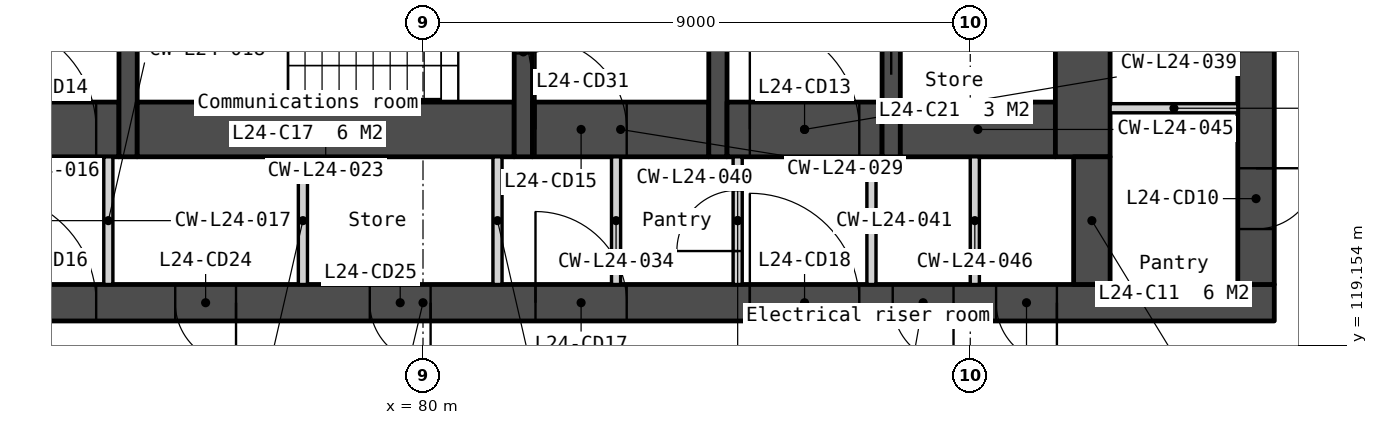
"""IFC4 building model, lengths in metres.
Left out: names, types, materials, properties, quantities, classifications, styles, units other than length and angle.
Written with IfcOpenShell. Run it as: python <this file> out.ifc"""

import sys

from ifc_helpers import new_model, si_unit, direction, frame, frame_2d, origin, place, context, subcontext, project, spatial, polyline, rectangle, outline, extrude, element, fill, save


model = new_model("IFC4")
c1 = context("Model", 3, precision=1e-05, world=origin(), true_north=direction((0.0, 1.0)))
c2 = subcontext(c1, "Body", "Model", "MODEL_VIEW")
j1 = project(units=[si_unit("LENGTHUNIT", "METRE"), si_unit("PLANEANGLEUNIT", "RADIAN")], contexts=[c1])
p1 = place(None, origin())
s1 = spatial("IfcSite", under=j1, at=p1, CompositionType="ELEMENT")
p2 = place(p1, origin())
s2 = spatial("IfcBuilding", under=s1, at=p2, CompositionType="ELEMENT")
p3 = place(p2, frame((0.0, 0.0, 99.3)))
s3 = spatial("IfcBuildingStorey", under=s2, at=p3, CompositionType="ELEMENT", Elevation=99.3)
p4 = place(p3, frame((66.0, 119.85, 0.0), z_axis=(0.0, 0.0, 1.0), x_axis=(1.0, 0.0, 0.0)))
e1 = element("IfcWall", 1, at=p4, inside=s3, PredefinedType="SOLIDWALL", context=c2, shape_type="SweptSolid", body=[
    extrude(rectangle(XDim=28.0, YDim=0.6, at=frame_2d((14.0, 0.0))), origin(), (0.0, 0.0, 1.0), 3.35),
])
p5 = place(p4, frame((6.825, 0.0, 0.0)))
e2 = element("IfcOpeningElement", 2, at=p5, cuts=e1, PredefinedType="OPENING", context=c2, shape_type="SweptSolid", body=[
    extrude(rectangle(XDim=1.8, YDim=2.1, at=frame_2d((0.9, 1.05))), frame((0.0, 0.31, 0.0), z_axis=(0.0, -1.0, 0.0), x_axis=(1.0, 0.0, 0.0)), (0.0, 0.0, 1.0), 0.62),
])
p6 = place(p4, frame((15.85, 0.0, 0.0)))
e3 = element("IfcOpeningElement", 3, at=p6, cuts=e1, PredefinedType="OPENING", context=c2, shape_type="SweptSolid", body=[
    extrude(rectangle(XDim=1.5, YDim=2.1, at=frame_2d((0.75, 1.05))), frame((0.0, 0.31, 0.0), z_axis=(0.0, -1.0, 0.0), x_axis=(1.0, 0.0, 0.0)), (0.0, 0.0, 1.0), 0.62),
])
p7 = place(p4, frame((19.375, 0.0, 0.0)))
e4 = element("IfcOpeningElement", 4, at=p7, cuts=e1, PredefinedType="OPENING", context=c2, shape_type="SweptSolid", body=[
    extrude(rectangle(XDim=1.8, YDim=2.1, at=frame_2d((0.9, 1.05))), frame((0.0, 0.31, 0.0), z_axis=(0.0, -1.0, 0.0), x_axis=(1.0, 0.0, 0.0)), (0.0, 0.0, 1.0), 0.62),
])
p8 = place(p4, frame((4.425, 0.0, 0.0)))
e5 = element("IfcOpeningElement", 5, at=p8, cuts=e1, PredefinedType="OPENING", context=c2, shape_type="SweptSolid", body=[
    extrude(rectangle(XDim=1.0, YDim=2.1, at=frame_2d((0.5, 1.05))), frame((0.0, 0.31, 0.0), z_axis=(0.0, -1.0, 0.0), x_axis=(1.0, 0.0, 0.0)), (0.0, 0.0, 1.0), 0.62),
])
p9 = place(p4, frame((9.925, 0.0, 0.0)))
e6 = element("IfcOpeningElement", 6, at=p9, cuts=e1, PredefinedType="OPENING", context=c2, shape_type="SweptSolid", body=[
    extrude(rectangle(XDim=1.0, YDim=2.1, at=frame_2d((0.5, 1.05))), frame((0.0, 0.31, 0.0), z_axis=(0.0, -1.0, 0.0), x_axis=(1.0, 0.0, 0.0)), (0.0, 0.0, 1.0), 0.62),
])
p10 = place(p4, frame((13.125, 0.0, 0.0)))
e7 = element("IfcOpeningElement", 7, at=p10, cuts=e1, PredefinedType="OPENING", context=c2, shape_type="SweptSolid", body=[
    extrude(rectangle(XDim=1.0, YDim=2.1, at=frame_2d((0.5, 1.05))), frame((0.0, 0.31, 0.0), z_axis=(0.0, -1.0, 0.0), x_axis=(1.0, 0.0, 0.0)), (0.0, 0.0, 1.0), 0.62),
])
p11 = place(p4, frame((21.725, 0.0, 0.0)))
e8 = element("IfcOpeningElement", 8, at=p11, cuts=e1, PredefinedType="OPENING", context=c2, shape_type="SweptSolid", body=[
    extrude(rectangle(XDim=1.0, YDim=2.1, at=frame_2d((0.5, 1.05))), frame((0.0, 0.31, 0.0), z_axis=(0.0, -1.0, 0.0), x_axis=(1.0, 0.0, 0.0)), (0.0, 0.0, 1.0), 0.62),
])
p12 = place(p4, frame((23.425, 0.0, 0.0)))
e9 = element("IfcOpeningElement", 9, at=p12, cuts=e1, PredefinedType="OPENING", context=c2, shape_type="SweptSolid", body=[
    extrude(rectangle(XDim=1.0, YDim=2.1, at=frame_2d((0.5, 1.05))), frame((0.0, 0.31, 0.0), z_axis=(0.0, -1.0, 0.0), x_axis=(1.0, 0.0, 0.0)), (0.0, 0.0, 1.0), 0.62),
])
p13 = place(p3, frame((72.45, 122.7, 0.0), z_axis=(0.0, 0.0, 1.0), x_axis=(1.0, 0.0, 0.0)))
e10 = element("IfcWall", 10, at=p13, inside=s3, PredefinedType="SOLIDWALL", context=c2, shape_type="SweptSolid", body=[
    extrude(rectangle(XDim=2.55, YDim=0.9, at=frame_2d((1.275, 0.0))), origin(), (0.0, 0.0, 1.0), 3.35),
])
p14 = place(p13, frame((0.375, 0.0, 0.0)))
e11 = element("IfcOpeningElement", 11, at=p14, cuts=e10, PredefinedType="OPENING", context=c2, shape_type="SweptSolid", body=[
    extrude(rectangle(XDim=1.8, YDim=2.1, at=frame_2d((0.9, 1.05))), frame((0.0, 0.46, 0.0), z_axis=(0.0, -1.0, 0.0), x_axis=(1.0, 0.0, 0.0)), (0.0, 0.0, 1.0), 0.92),
])
p15 = place(p3, frame((74.825, 122.25, 0.0), z_axis=(0.0, 0.0, 1.0), x_axis=(0.0, -1.0, 0.0)))
e12 = element("IfcWall", 12, at=p15, inside=s3, PredefinedType="PARTITIONING", context=c2, shape_type="SweptSolid", body=[
    extrude(rectangle(XDim=2.1, YDim=0.15, at=frame_2d((1.05, 0.0))), origin(), (0.0, 0.0, 1.0), 3.35),
])
p16 = place(p3, frame((75.15, 133.95, 0.0), z_axis=(0.0, 0.0, 1.0), x_axis=(0.0, -1.0, 0.0)))
e13 = element("IfcWall", 13, at=p16, inside=s3, PredefinedType="SOLIDWALL", context=c2, shape_type="SweptSolid", body=[
    extrude(rectangle(XDim=11.7, YDim=0.3, at=frame_2d((5.85, 0.0))), origin(), (0.0, 0.0, 1.0), 3.35),
])
p17 = place(p3, frame((75.3, 122.7, 0.0), z_axis=(0.0, 0.0, 1.0), x_axis=(1.0, 0.0, 0.0)))
e14 = element("IfcWall", 14, at=p17, inside=s3, PredefinedType="SOLIDWALL", context=c2, shape_type="SweptSolid", body=[
    extrude(rectangle(XDim=6.2, YDim=0.9, at=frame_2d((3.1, 0.0))), origin(), (0.0, 0.0, 1.0), 3.35),
])
for number, where, z_axis, x_axis in (
    (15, (78.025, 122.25, 0.0), (0.0, 0.0, 1.0), (0.0, -1.0, 0.0)),
    (16, (81.225, 122.25, 0.0), (0.0, 0.0, 1.0), (0.0, -1.0, 0.0)),
):
    element("IfcWall", number, at=place(p3, frame(where, z_axis=z_axis, x_axis=x_axis)), inside=s3, PredefinedType="PARTITIONING", context=c2, shape_type="SweptSolid", body=[
        extrude(rectangle(XDim=2.1, YDim=0.15, at=frame_2d((1.05, 0.0))), origin(), (0.0, 0.0, 1.0), 3.35),
    ])
p18 = place(p3, frame((81.65, 125.7, 0.0), z_axis=(0.0, 0.0, 1.0), x_axis=(0.0, -1.0, 0.0)))
e17 = element("IfcWall", 17, at=p18, inside=s3, PredefinedType="SOLIDWALL", context=c2, shape_type="SweptSolid", body=[
    extrude(rectangle(XDim=3.45, YDim=0.3, at=frame_2d((1.725, 0.0))), origin(), (0.0, 0.0, 1.0), 3.35),
])
p19 = place(p18, frame((0.75, 0.0, 0.0)))
e18 = element("IfcOpeningElement", 18, at=p19, cuts=e17, PredefinedType="OPENING", context=c2, shape_type="SweptSolid", body=[
    extrude(rectangle(XDim=1.0, YDim=2.1, at=frame_2d((0.5, 1.05))), frame((0.0, 0.16, 0.0), z_axis=(0.0, -1.0, 0.0), x_axis=(1.0, 0.0, 0.0)), (0.0, 0.0, 1.0), 0.32),
])
p20 = place(p3, frame((81.8, 122.7, 0.0), z_axis=(0.0, 0.0, 1.0), x_axis=(1.0, 0.0, 0.0)))
e19 = element("IfcWall", 19, at=p20, inside=s3, PredefinedType="SOLIDWALL", context=c2, shape_type="SweptSolid", body=[
    extrude(rectangle(XDim=2.9, YDim=0.9, at=frame_2d((1.45, 0.0))), origin(), (0.0, 0.0, 1.0), 3.35),
])
p21 = place(p20, frame((0.05, 0.0, 0.0)))
e20 = element("IfcOpeningElement", 20, at=p21, cuts=e19, PredefinedType="OPENING", context=c2, shape_type="SweptSolid", body=[
    extrude(rectangle(XDim=1.5, YDim=2.1, at=frame_2d((0.75, 1.05))), frame((0.0, 0.46, 0.0), z_axis=(0.0, -1.0, 0.0), x_axis=(1.0, 0.0, 0.0)), (0.0, 0.0, 1.0), 0.92),
])
p22 = place(p3, frame((83.175, 122.25, 0.0), z_axis=(0.0, 0.0, 1.0), x_axis=(0.0, -1.0, 0.0)))
e21 = element("IfcWall", 21, at=p22, inside=s3, PredefinedType="PARTITIONING", context=c2, shape_type="SweptSolid", body=[
    extrude(rectangle(XDim=2.1, YDim=0.15, at=frame_2d((1.05, 0.0))), origin(), (0.0, 0.0, 1.0), 3.35),
])
p23 = place(p3, frame((84.85, 133.95, 0.0), z_axis=(0.0, 0.0, 1.0), x_axis=(0.0, -1.0, 0.0)))
e22 = element("IfcWall", 22, at=p23, inside=s3, PredefinedType="SOLIDWALL", context=c2, shape_type="SweptSolid", body=[
    extrude(rectangle(XDim=11.7, YDim=0.3, at=frame_2d((5.85, 0.0))), origin(), (0.0, 0.0, 1.0), 3.35),
])
p24 = place(p3, frame((85.0, 122.7, 0.0), z_axis=(0.0, 0.0, 1.0), x_axis=(1.0, 0.0, 0.0)))
e23 = element("IfcWall", 23, at=p24, inside=s3, PredefinedType="SOLIDWALL", context=c2, shape_type="SweptSolid", body=[
    extrude(rectangle(XDim=2.55, YDim=0.9, at=frame_2d((1.275, 0.0))), origin(), (0.0, 0.0, 1.0), 3.35),
])
p25 = place(p24, frame((0.375, 0.0, 0.0)))
e24 = element("IfcOpeningElement", 24, at=p25, cuts=e23, PredefinedType="OPENING", context=c2, shape_type="SweptSolid", body=[
    extrude(rectangle(XDim=1.8, YDim=2.1, at=frame_2d((0.9, 1.05))), frame((0.0, 0.46, 0.0), z_axis=(0.0, -1.0, 0.0), x_axis=(1.0, 0.0, 0.0)), (0.0, 0.0, 1.0), 0.92),
])
p26 = place(p3, frame((85.175, 122.25, 0.0), z_axis=(0.0, 0.0, 1.0), x_axis=(0.0, -1.0, 0.0)))
e25 = element("IfcWall", 25, at=p26, inside=s3, PredefinedType="PARTITIONING", context=c2, shape_type="SweptSolid", body=[
    extrude(rectangle(XDim=2.1, YDim=0.15, at=frame_2d((1.05, 0.0))), origin(), (0.0, 0.0, 1.0), 3.35),
])
p27 = place(p26, frame((0.55, 0.0, 0.0)))
e26 = element("IfcOpeningElement", 26, at=p27, cuts=e25, PredefinedType="OPENING", context=c2, shape_type="SweptSolid", body=[
    extrude(rectangle(XDim=1.0, YDim=2.1, at=frame_2d((0.5, 1.05))), frame((0.0, 0.085, 0.0), z_axis=(0.0, -1.0, 0.0), x_axis=(1.0, 0.0, 0.0)), (0.0, 0.0, 1.0), 0.17),
])
p28 = place(p3, frame((87.375, 122.25, 0.0), z_axis=(0.0, 0.0, 1.0), x_axis=(0.0, -1.0, 0.0)))
e27 = element("IfcWall", 27, at=p28, inside=s3, PredefinedType="PARTITIONING", context=c2, shape_type="SweptSolid", body=[
    extrude(rectangle(XDim=2.1, YDim=0.15, at=frame_2d((1.05, 0.0))), origin(), (0.0, 0.0, 1.0), 3.35),
])
p29 = place(p3, frame((87.7, 133.95, 0.0), z_axis=(0.0, 0.0, 1.0), x_axis=(0.0, -1.0, 0.0)))
e28 = element("IfcWall", 28, at=p29, inside=s3, PredefinedType="SOLIDWALL", context=c2, shape_type="SweptSolid", body=[
    extrude(rectangle(XDim=11.7, YDim=0.3, at=frame_2d((5.85, 0.0))), origin(), (0.0, 0.0, 1.0), 3.35),
])
p30 = place(p29, frame((6.95, 0.0, 0.0)))
e29 = element("IfcOpeningElement", 29, at=p30, cuts=e28, PredefinedType="OPENING", context=c2, shape_type="SweptSolid", body=[
    extrude(rectangle(XDim=1.1, YDim=2.1, at=frame_2d((0.55, 1.05))), frame((0.0, 0.16, 0.0), z_axis=(0.0, -1.0, 0.0), x_axis=(1.0, 0.0, 0.0)), (0.0, 0.0, 1.0), 0.32),
])
p31 = place(p29, frame((5.1, 0.0, 0.0)))
e30 = element("IfcOpeningElement", 30, at=p31, cuts=e28, PredefinedType="OPENING", context=c2, shape_type="SweptSolid", body=[
    extrude(rectangle(XDim=1.0, YDim=2.1, at=frame_2d((0.5, 1.05))), frame((0.0, 0.16, 0.0), z_axis=(0.0, -1.0, 0.0), x_axis=(1.0, 0.0, 0.0)), (0.0, 0.0, 1.0), 0.32),
])
p32 = place(p29, frame((9.25, 0.0, 0.0)))
e31 = element("IfcOpeningElement", 31, at=p32, cuts=e28, PredefinedType="OPENING", context=c2, shape_type="SweptSolid", body=[
    extrude(rectangle(XDim=1.1, YDim=2.1, at=frame_2d((0.55, 1.05))), frame((0.0, 0.16, 0.0), z_axis=(0.0, -1.0, 0.0), x_axis=(1.0, 0.0, 0.0)), (0.0, 0.0, 1.0), 0.32),
])
p33 = place(p3, frame((87.85, 122.7, 0.0), z_axis=(0.0, 0.0, 1.0), x_axis=(1.0, 0.0, 0.0)))
e32 = element("IfcWall", 32, at=p33, inside=s3, PredefinedType="SOLIDWALL", context=c2, shape_type="SweptSolid", body=[
    extrude(rectangle(XDim=2.55, YDim=0.9, at=frame_2d((1.275, 0.0))), origin(), (0.0, 0.0, 1.0), 3.35),
])
p34 = place(p3, frame((89.075, 122.25, 0.0), z_axis=(0.0, 0.0, 1.0), x_axis=(0.0, -1.0, 0.0)))
e33 = element("IfcWall", 33, at=p34, inside=s3, PredefinedType="PARTITIONING", context=c2, shape_type="SweptSolid", body=[
    extrude(rectangle(XDim=2.1, YDim=0.15, at=frame_2d((1.05, 0.0))), origin(), (0.0, 0.0, 1.0), 3.35),
])
p35 = place(p3, frame((90.85, 133.95, 0.0), z_axis=(0.0, 0.0, 1.0), x_axis=(0.0, -1.0, 0.0)))
e34 = element("IfcWall", 34, at=p35, inside=s3, PredefinedType="SOLIDWALL", context=c2, shape_type="SweptSolid", body=[
    extrude(rectangle(XDim=11.7, YDim=0.9, at=frame_2d((5.85, 0.0))), origin(), (0.0, 0.0, 1.0), 3.35),
])
p36 = place(p3, frame((91.0, 122.25, 0.0), z_axis=(0.0, 0.0, 1.0), x_axis=(0.0, -1.0, 0.0)))
e35 = element("IfcWall", 35, at=p36, inside=s3, PredefinedType="SOLIDWALL", context=c2, shape_type="SweptSolid", body=[
    extrude(rectangle(XDim=2.1, YDim=0.6, at=frame_2d((1.05, 0.0))), origin(), (0.0, 0.0, 1.0), 3.35),
])
p37 = place(p3, frame((91.3, 123.049, 0.0), z_axis=(0.0, 0.0, 1.0), x_axis=(1.0, 0.0, 0.0)))
e36 = element("IfcWall", 36, at=p37, inside=s3, PredefinedType="PARTITIONING", context=c2, shape_type="SweptSolid", body=[
    extrude(rectangle(XDim=2.1, YDim=0.15, at=frame_2d((1.05, 0.0))), origin(), (0.0, 0.0, 1.0), 3.35),
])
p38 = place(p3, frame((93.7, 133.95, 0.0), z_axis=(0.0, 0.0, 1.0), x_axis=(0.0, -1.0, 0.0)))
e37 = element("IfcWall", 37, at=p38, inside=s3, PredefinedType="SOLIDWALL", context=c2, shape_type="SweptSolid", body=[
    extrude(rectangle(XDim=13.8, YDim=0.6, at=frame_2d((6.9, 0.0))), origin(), (0.0, 0.0, 1.0), 3.35),
])
p39 = place(p38, frame((0.6, 0.0, 0.0)))
e38 = element("IfcOpeningElement", 38, at=p39, cuts=e37, PredefinedType="OPENING", context=c2, shape_type="SweptSolid", body=[
    extrude(rectangle(XDim=1.1, YDim=2.1, at=frame_2d((0.55, 1.05))), frame((0.0, 0.31, 0.0), z_axis=(0.0, -1.0, 0.0), x_axis=(1.0, 0.0, 0.0)), (0.0, 0.0, 1.0), 0.62),
])
p40 = place(p38, frame((8.963, 0.0, 0.0)))
e39 = element("IfcOpeningElement", 39, at=p40, cuts=e37, PredefinedType="OPENING", context=c2, shape_type="SweptSolid", body=[
    extrude(rectangle(XDim=1.0, YDim=2.1, at=frame_2d((0.5, 1.05))), frame((0.0, 0.31, 0.0), z_axis=(0.0, -1.0, 0.0), x_axis=(1.0, 0.0, 0.0)), (0.0, 0.0, 1.0), 0.62),
])
p41 = place(p38, frame((11.888, 0.0, 0.0)))
e40 = element("IfcOpeningElement", 40, at=p41, cuts=e37, PredefinedType="OPENING", context=c2, shape_type="SweptSolid", body=[
    extrude(rectangle(XDim=1.0, YDim=2.1, at=frame_2d((0.5, 1.05))), frame((0.0, 0.31, 0.0), z_axis=(0.0, -1.0, 0.0), x_axis=(1.0, 0.0, 0.0)), (0.0, 0.0, 1.0), 0.62),
])
p42 = place(p3, frame((82.605, 93.333, -0.15), z_axis=(0.0, 0.0, 1.0), x_axis=(0.500000478905, 0.866025127289, 0.0)))
e41 = element("IfcWall", 41, at=p42, inside=s3, PredefinedType="SOLIDWALL", context=c2, shape_type="SweptSolid", body=[
    extrude(outline(polyline([(42.643, 0.0), (42.643, 3.5), (0.0, 3.5), (0.0, 0.0), (42.643, 0.0)])), frame((0.0, 0.225, 0.0), z_axis=(0.0, -1.0, 0.0), x_axis=(1.0, 0.0, 0.0)), (0.0, 0.0, 1.0), 0.45),
])
p43 = place(p42, frame((7.079, 0.0, 1.05)))
e42 = element("IfcOpeningElement", 42, at=p43, cuts=e41, PredefinedType="OPENING", context=c2, shape_type="SweptSolid", body=[
    extrude(rectangle(XDim=1.2, YDim=1.5, at=frame_2d((0.6, 0.75))), frame((0.0, 0.235, 0.0), z_axis=(0.0, -1.0, 0.0), x_axis=(1.0, 0.0, 0.0)), (0.0, 0.0, 1.0), 0.47),
])
p44 = place(p42, frame((8.779, 0.0, 1.05)))
e43 = element("IfcOpeningElement", 43, at=p44, cuts=e41, PredefinedType="OPENING", context=c2, shape_type="SweptSolid", body=[
    extrude(rectangle(XDim=1.2, YDim=1.5, at=frame_2d((0.6, 0.75))), frame((0.0, 0.235, 0.0), z_axis=(0.0, -1.0, 0.0), x_axis=(1.0, 0.0, 0.0)), (0.0, 0.0, 1.0), 0.47),
])
p45 = place(p42, frame((15.607, 0.0, 1.05)))
e44 = element("IfcOpeningElement", 44, at=p45, cuts=e41, PredefinedType="OPENING", context=c2, shape_type="SweptSolid", body=[
    extrude(rectangle(XDim=1.2, YDim=1.5, at=frame_2d((0.6, 0.75))), frame((0.0, 0.235, 0.0), z_axis=(0.0, -1.0, 0.0), x_axis=(1.0, 0.0, 0.0)), (0.0, 0.0, 1.0), 0.47),
])
p46 = place(p42, frame((17.307, 0.0, 1.05)))
e45 = element("IfcOpeningElement", 45, at=p46, cuts=e41, PredefinedType="OPENING", context=c2, shape_type="SweptSolid", body=[
    extrude(rectangle(XDim=1.2, YDim=1.5, at=frame_2d((0.6, 0.75))), frame((0.0, 0.235, 0.0), z_axis=(0.0, -1.0, 0.0), x_axis=(1.0, 0.0, 0.0)), (0.0, 0.0, 1.0), 0.47),
])
p47 = place(p42, frame((24.136, 0.0, 1.05)))
e46 = element("IfcOpeningElement", 46, at=p47, cuts=e41, PredefinedType="OPENING", context=c2, shape_type="SweptSolid", body=[
    extrude(rectangle(XDim=1.2, YDim=1.5, at=frame_2d((0.6, 0.75))), frame((0.0, 0.235, 0.0), z_axis=(0.0, -1.0, 0.0), x_axis=(1.0, 0.0, 0.0)), (0.0, 0.0, 1.0), 0.47),
])
p48 = place(p42, frame((25.836, 0.0, 1.05)))
e47 = element("IfcOpeningElement", 47, at=p48, cuts=e41, PredefinedType="OPENING", context=c2, shape_type="SweptSolid", body=[
    extrude(rectangle(XDim=1.2, YDim=1.5, at=frame_2d((0.6, 0.75))), frame((0.0, 0.235, 0.0), z_axis=(0.0, -1.0, 0.0), x_axis=(1.0, 0.0, 0.0)), (0.0, 0.0, 1.0), 0.47),
])
p49 = place(p42, frame((32.665, 0.0, 1.05)))
e48 = element("IfcOpeningElement", 48, at=p49, cuts=e41, PredefinedType="OPENING", context=c2, shape_type="SweptSolid", body=[
    extrude(rectangle(XDim=1.2, YDim=1.5, at=frame_2d((0.6, 0.75))), frame((0.0, 0.235, 0.0), z_axis=(0.0, -1.0, 0.0), x_axis=(1.0, 0.0, 0.0)), (0.0, 0.0, 1.0), 0.47),
])
p50 = place(p42, frame((34.365, 0.0, 1.05)))
e49 = element("IfcOpeningElement", 49, at=p50, cuts=e41, PredefinedType="OPENING", context=c2, shape_type="SweptSolid", body=[
    extrude(rectangle(XDim=1.2, YDim=1.5, at=frame_2d((0.6, 0.75))), frame((0.0, 0.235, 0.0), z_axis=(0.0, -1.0, 0.0), x_axis=(1.0, 0.0, 0.0)), (0.0, 0.0, 1.0), 0.47),
])
p51 = place(p41, origin())
e50 = element("IfcDoor", 50, at=p51, inside=s3, OperationType="SINGLE_SWING_LEFT", PredefinedType="DOOR", context=c2, shape_type="SweptSolid", body=[
    extrude(rectangle(XDim=1.0, YDim=2.1, at=frame_2d((0.5, 1.05))), frame((0.0, 0.025, 0.0), z_axis=(0.0, -1.0, 0.0), x_axis=(1.0, 0.0, 0.0)), (0.0, 0.0, 1.0), 0.05),
])
fill(e40, e50)
p52 = place(p25, origin())
e51 = element("IfcDoor", 51, at=p52, inside=s3, OperationType="DOUBLE_DOOR_DOUBLE_SWING", PredefinedType="DOOR", context=c2, shape_type="SweptSolid", body=[
    extrude(rectangle(XDim=1.8, YDim=2.1, at=frame_2d((0.9, 1.05))), frame((0.0, 0.025, 0.0), z_axis=(0.0, -1.0, 0.0), x_axis=(1.0, 0.0, 0.0)), (0.0, 0.0, 1.0), 0.05),
])
fill(e24, e51)
p53 = place(p14, origin())
e52 = element("IfcDoor", 52, at=p53, inside=s3, OperationType="DOUBLE_DOOR_DOUBLE_SWING", PredefinedType="DOOR", context=c2, shape_type="SweptSolid", body=[
    extrude(rectangle(XDim=1.8, YDim=2.1, at=frame_2d((0.9, 1.05))), frame((0.0, 0.025, 0.0), z_axis=(0.0, -1.0, 0.0), x_axis=(1.0, 0.0, 0.0)), (0.0, 0.0, 1.0), 0.05),
])
fill(e11, e52)
p54 = place(p21, origin())
e53 = element("IfcDoor", 53, at=p54, inside=s3, OperationType="DOUBLE_DOOR_DOUBLE_SWING", PredefinedType="DOOR", context=c2, shape_type="SweptSolid", body=[
    extrude(rectangle(XDim=1.5, YDim=2.1, at=frame_2d((0.75, 1.05))), frame((0.0, 0.025, 0.0), z_axis=(0.0, -1.0, 0.0), x_axis=(1.0, 0.0, 0.0)), (0.0, 0.0, 1.0), 0.05),
])
fill(e20, e53)
p55 = place(p5, origin())
e54 = element("IfcDoor", 54, at=p55, inside=s3, OperationType="DOUBLE_DOOR_DOUBLE_SWING", PredefinedType="DOOR", context=c2, shape_type="SweptSolid", body=[
    extrude(rectangle(XDim=1.8, YDim=2.1, at=frame_2d((0.9, 1.05))), frame((0.0, 0.025, 0.0), z_axis=(0.0, -1.0, 0.0), x_axis=(1.0, 0.0, 0.0)), (0.0, 0.0, 1.0), 0.05),
])
fill(e2, e54)
p56 = place(p6, origin())
e55 = element("IfcDoor", 55, at=p56, inside=s3, OperationType="DOUBLE_DOOR_DOUBLE_SWING", PredefinedType="DOOR", context=c2, shape_type="SweptSolid", body=[
    extrude(rectangle(XDim=1.5, YDim=2.1, at=frame_2d((0.75, 1.05))), frame((0.0, 0.025, 0.0), z_axis=(0.0, -1.0, 0.0), x_axis=(1.0, 0.0, 0.0)), (0.0, 0.0, 1.0), 0.05),
])
fill(e3, e55)
p57 = place(p7, origin())
e56 = element("IfcDoor", 56, at=p57, inside=s3, OperationType="DOUBLE_DOOR_DOUBLE_SWING", PredefinedType="DOOR", context=c2, shape_type="SweptSolid", body=[
    extrude(rectangle(XDim=1.8, YDim=2.1, at=frame_2d((0.9, 1.05))), frame((0.0, 0.025, 0.0), z_axis=(0.0, -1.0, 0.0), x_axis=(1.0, 0.0, 0.0)), (0.0, 0.0, 1.0), 0.05),
])
fill(e4, e56)
p58 = place(p9, origin())
e57 = element("IfcDoor", 57, at=p58, inside=s3, OperationType="SINGLE_SWING_RIGHT", PredefinedType="DOOR", context=c2, shape_type="SweptSolid", body=[
    extrude(rectangle(XDim=1.0, YDim=2.1, at=frame_2d((0.5, 1.05))), frame((0.0, 0.025, 0.0), z_axis=(0.0, -1.0, 0.0), x_axis=(1.0, 0.0, 0.0)), (0.0, 0.0, 1.0), 0.05),
])
fill(e6, e57)
p59 = place(p10, origin())
e58 = element("IfcDoor", 58, at=p59, inside=s3, OperationType="SINGLE_SWING_RIGHT", PredefinedType="DOOR", context=c2, shape_type="SweptSolid", body=[
    extrude(rectangle(XDim=1.0, YDim=2.1, at=frame_2d((0.5, 1.05))), frame((0.0, 0.025, 0.0), z_axis=(0.0, -1.0, 0.0), x_axis=(1.0, 0.0, 0.0)), (0.0, 0.0, 1.0), 0.05),
])
fill(e7, e58)
p60 = place(p27, origin())
e59 = element("IfcDoor", 59, at=p60, inside=s3, OperationType="SINGLE_SWING_RIGHT", PredefinedType="DOOR", context=c2, shape_type="SweptSolid", body=[
    extrude(rectangle(XDim=1.0, YDim=2.1, at=frame_2d((0.5, 1.05))), frame((0.0, 0.025, 0.0), z_axis=(0.0, -1.0, 0.0), x_axis=(1.0, 0.0, 0.0)), (0.0, 0.0, 1.0), 0.05),
])
fill(e26, e59)
p61 = place(p11, origin())
e60 = element("IfcDoor", 60, at=p61, inside=s3, OperationType="SINGLE_SWING_RIGHT", PredefinedType="DOOR", context=c2, shape_type="SweptSolid", body=[
    extrude(rectangle(XDim=1.0, YDim=2.1, at=frame_2d((0.5, 1.05))), frame((0.0, 0.025, 0.0), z_axis=(0.0, -1.0, 0.0), x_axis=(1.0, 0.0, 0.0)), (0.0, 0.0, 1.0), 0.05),
])
fill(e8, e60)
p62 = place(p12, origin())
e61 = element("IfcDoor", 61, at=p62, inside=s3, OperationType="SINGLE_SWING_RIGHT", PredefinedType="DOOR", context=c2, shape_type="SweptSolid", body=[
    extrude(rectangle(XDim=1.0, YDim=2.1, at=frame_2d((0.5, 1.05))), frame((0.0, 0.025, 0.0), z_axis=(0.0, -1.0, 0.0), x_axis=(1.0, 0.0, 0.0)), (0.0, 0.0, 1.0), 0.05),
])
fill(e9, e61)
p63 = place(p19, origin())
e62 = element("IfcDoor", 62, at=p63, inside=s3, OperationType="SINGLE_SWING_LEFT", PredefinedType="DOOR", context=c2, shape_type="SweptSolid", body=[
    extrude(rectangle(XDim=1.0, YDim=2.1, at=frame_2d((0.5, 1.05))), frame((0.0, 0.025, 0.0), z_axis=(0.0, -1.0, 0.0), x_axis=(1.0, 0.0, 0.0)), (0.0, 0.0, 1.0), 0.05),
])
fill(e18, e62)
p64 = place(p32, origin())
e63 = element("IfcDoor", 63, at=p64, inside=s3, OperationType="SLIDING_TO_LEFT", PredefinedType="DOOR", context=c2, shape_type="SweptSolid", body=[
    extrude(rectangle(XDim=1.1, YDim=2.1, at=frame_2d((0.55, 1.05))), frame((0.0, 0.025, 0.0), z_axis=(0.0, -1.0, 0.0), x_axis=(1.0, 0.0, 0.0)), (0.0, 0.0, 1.0), 0.05),
])
fill(e31, e63)
save(model, sys.argv[1])
